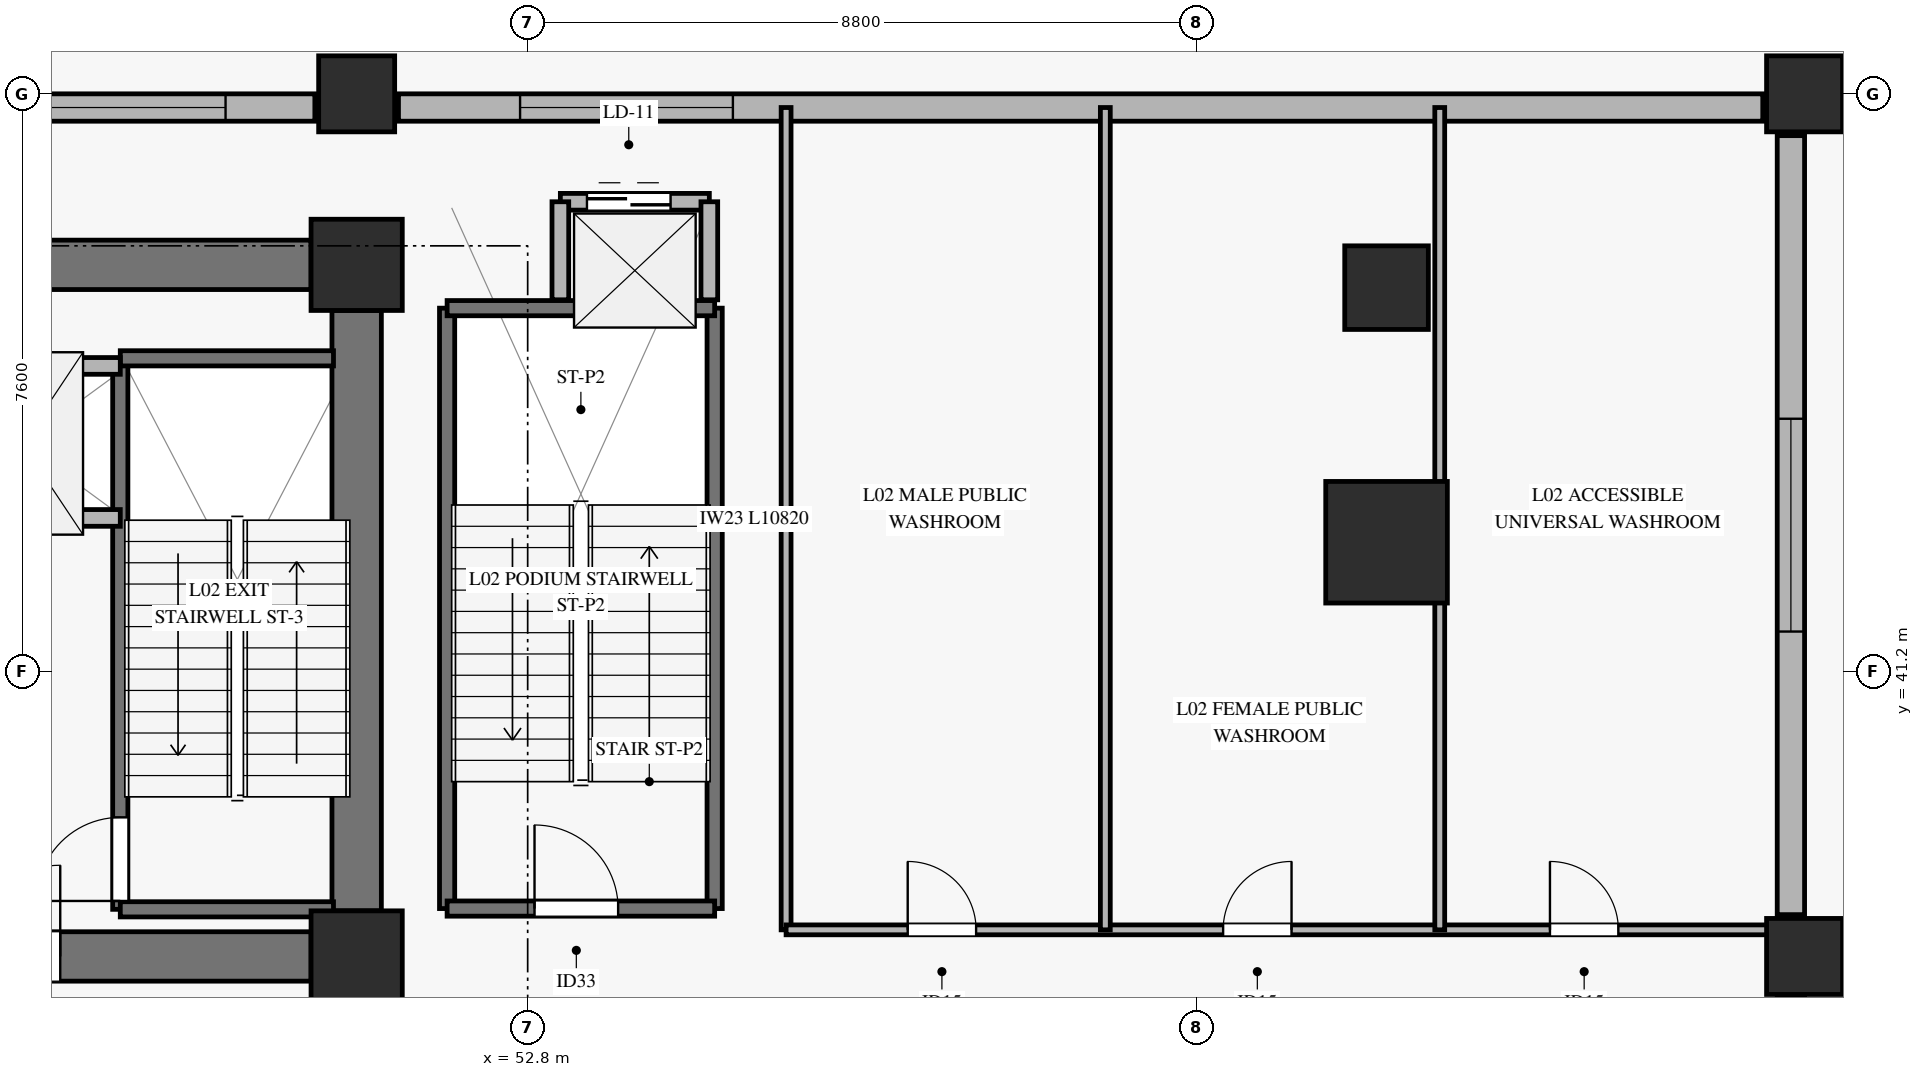
"""IFC4 building model, lengths in metres.
Left out: names, types, materials, properties, quantities, classifications, styles, units other than length and angle.
Written with IfcOpenShell. Run it as: python <this file> out.ifc"""

import sys

from ifc_helpers import new_model, si_unit, direction, frame, frame_2d, origin, origin_2d, place, context, subcontext, project, spatial, rectangle, hollow_rectangle, extrude, source, transform, mapped, element, fill, save


model = new_model("IFC4")
c1 = context("Model", 3, precision=1e-05, world=origin(), true_north=direction((0.0, 1.0)))
c2 = subcontext(c1, "Body", "Model", "MODEL_VIEW")
j1 = project(units=[si_unit("LENGTHUNIT", "METRE"), si_unit("PLANEANGLEUNIT", "RADIAN")], contexts=[c1])
p1 = place(None, origin())
s1 = spatial("IfcSite", under=j1, at=p1, CompositionType="ELEMENT")
p2 = place(p1, origin())
s2 = spatial("IfcBuilding", under=s1, at=p2, CompositionType="ELEMENT")
p3 = place(p2, frame((0.0, 0.0, 5.6)))
s3 = spatial("IfcBuildingStorey", under=s2, at=p3, CompositionType="ELEMENT", Elevation=5.6)
m1 = source(origin(), c2, "Body", "SweptSolid", [
    extrude(rectangle(XDim=1.2, YDim=1.2, at=origin_2d()), origin(), (0.0, 0.0, 1.0), 4.54),
])
for number, where, z_axis, x_axis in (
    (1, (50.55, 37.45, 0.0), (0.0, 0.0, 1.0), (1.0, 0.0, 0.0)),
    (2, (50.55, 46.55, 0.0), (0.0, 0.0, 1.0), (1.0, 0.0, 0.0)),
):
    element("IfcColumn", number, at=place(p3, frame(where, z_axis=z_axis, x_axis=x_axis)), inside=s3, PredefinedType="PILASTER", context=c2, shape_type="MappedRepresentation", body=[
        mapped(m1, transform((0.0, 0.0, 0.0), x_axis=(1.0, 0.0, 0.0), y_axis=(0.0, 1.0, 0.0), z_axis=(0.0, 0.0, 1.0), scale=1.0)),
    ])
p4 = place(p3, frame((44.9, 46.55, 0.0), z_axis=(0.0, 0.0, 1.0), x_axis=(1.0, 0.0, 0.0)))
e3 = element("IfcWall", 3, at=p4, inside=s3, PredefinedType="SHEAR", context=c2, shape_type="SweptSolid", body=[
    extrude(rectangle(XDim=5.05, YDim=0.65, at=frame_2d((2.525, 0.0))), origin(), (0.0, 0.0, 1.0), 4.54),
])
p5 = place(p3, frame((44.9, 37.45, 0.0), z_axis=(0.0, 0.0, 1.0), x_axis=(1.0, 0.0, 0.0)))
e4 = element("IfcWall", 4, at=p5, inside=s3, PredefinedType="SHEAR", context=c2, shape_type="SweptSolid", body=[
    extrude(rectangle(XDim=5.05, YDim=0.65, at=frame_2d((2.525, 0.0))), origin(), (0.0, 0.0, 1.0), 4.54),
])
p6 = place(p5, frame((0.55, 0.0, 0.0)))
e5 = element("IfcOpeningElement", 5, at=p6, cuts=e4, PredefinedType="OPENING", context=c2, shape_type="SweptSolid", body=[
    extrude(rectangle(XDim=1.2, YDim=2.15, at=frame_2d((0.6, 1.075))), frame((0.0, 0.335, 0.0), z_axis=(0.0, -1.0, 0.0), x_axis=(1.0, 0.0, 0.0)), (0.0, 0.0, 1.0), 0.67),
])
p7 = place(p3, frame((50.55, 38.05, 0.0), z_axis=(0.0, 0.0, 1.0), x_axis=(0.0, 1.0, 0.0)))
e6 = element("IfcWall", 6, at=p7, inside=s3, PredefinedType="SHEAR", context=c2, shape_type="SweptSolid", body=[
    extrude(rectangle(XDim=7.9, YDim=0.65, at=frame_2d((3.95, 0.0))), origin(), (0.0, 0.0, 1.0), 4.54),
])
m2 = source(origin(), c2, "Body", "SweptSolid", [
    extrude(hollow_rectangle(XDim=1.6, YDim=1.6, WallThickness=0.075, at=origin_2d()), origin(), (0.0, 0.0, 1.0), 4.54),
])
p8 = place(p3, frame((64.1, 42.9, 0.0), z_axis=(0.0, 0.0, 1.0), x_axis=(1.0, 0.0, 0.0)))
e7 = element("IfcColumn", 7, at=p8, inside=s3, PredefinedType="COLUMN", context=c2, shape_type="MappedRepresentation", body=[
    mapped(m2, transform((0.0, 0.0, 0.0), x_axis=(1.0, 0.0, 0.0), y_axis=(0.0, 1.0, 0.0), z_axis=(0.0, 0.0, 1.0), scale=1.0)),
])
m3 = source(origin(), c2, "Body", "SweptSolid", [
    extrude(hollow_rectangle(XDim=1.1, YDim=1.1, WallThickness=0.05, at=origin_2d()), origin(), (0.0, 0.0, 1.0), 4.54),
])
p9 = place(p3, frame((64.1, 46.25, 0.0), z_axis=(0.0, 0.0, 1.0), x_axis=(1.0, 0.0, 0.0)))
e8 = element("IfcColumn", 8, at=p9, inside=s3, PredefinedType="COLUMN", context=c2, shape_type="MappedRepresentation", body=[
    mapped(m3, transform((0.0, 0.0, 0.0), x_axis=(1.0, 0.0, 0.0), y_axis=(0.0, 1.0, 0.0), z_axis=(0.0, 0.0, 1.0), scale=1.0)),
])
m4 = source(origin(), c2, "Body", "SweptSolid", [
    extrude(hollow_rectangle(XDim=1.0, YDim=1.0, WallThickness=0.045, at=origin_2d()), origin(), (0.0, 0.0, 1.0), 4.54),
])
for number, where, z_axis, x_axis in (
    (9, (69.6, 37.45, 0.0), (0.0, 0.0, 1.0), (1.0, 0.0, 0.0)),
    (10, (50.55, 48.8, 0.0), (0.0, 0.0, 1.0), (1.0, 0.0, 0.0)),
    (11, (69.6, 48.8, 0.0), (0.0, 0.0, 1.0), (1.0, 0.0, 0.0)),
):
    element("IfcColumn", number, at=place(p3, frame(where, z_axis=z_axis, x_axis=x_axis)), inside=s3, PredefinedType="COLUMN", context=c2, shape_type="MappedRepresentation", body=[
        mapped(m4, transform((0.0, 0.0, 0.0), x_axis=(1.0, 0.0, 0.0), y_axis=(0.0, 1.0, 0.0), z_axis=(0.0, 0.0, 1.0), scale=1.0)),
    ])
p10 = place(p3, frame((44.85, 48.62, 0.0), z_axis=(0.0, 0.0, 1.0), x_axis=(1.0, 0.0, 0.0)))
e12 = element("IfcWall", 12, at=p10, inside=s3, PredefinedType="SOLIDWALL", context=c2, shape_type="SweptSolid", body=[
    extrude(rectangle(XDim=5.15, YDim=0.36, at=frame_2d((2.575, 0.0))), origin(), (0.0, 0.0, 1.0), 3.42),
])
p11 = place(p10, frame((1.175, 0.0, 0.72)))
e13 = element("IfcOpeningElement", 13, at=p11, cuts=e12, PredefinedType="OPENING", context=c2, shape_type="SweptSolid", body=[
    extrude(rectangle(XDim=2.8, YDim=2.0, at=frame_2d((1.4, 1.0))), frame((0.0, 0.19, 0.0), z_axis=(0.0, -1.0, 0.0), x_axis=(1.0, 0.0, 0.0)), (0.0, 0.0, 1.0), 0.38),
])
p12 = place(p3, frame((51.1, 48.62, 0.0), z_axis=(0.0, 0.0, 1.0), x_axis=(1.0, 0.0, 0.0)))
e14 = element("IfcWall", 14, at=p12, inside=s3, PredefinedType="SOLIDWALL", context=c2, shape_type="SweptSolid", body=[
    extrude(rectangle(XDim=17.95, YDim=0.36, at=frame_2d((8.975, 0.0))), origin(), (0.0, 0.0, 1.0), 3.42),
])
p13 = place(p12, frame((1.6, 0.0, 0.72)))
e15 = element("IfcOpeningElement", 15, at=p13, cuts=e14, PredefinedType="OPENING", context=c2, shape_type="SweptSolid", body=[
    extrude(rectangle(XDim=2.8, YDim=2.0, at=frame_2d((1.4, 1.0))), frame((0.0, 0.19, 0.0), z_axis=(0.0, -1.0, 0.0), x_axis=(1.0, 0.0, 0.0)), (0.0, 0.0, 1.0), 0.38),
])
p14 = place(p3, frame((69.42, 38.0, 0.0), z_axis=(0.0, 0.0, 1.0), x_axis=(0.0, 1.0, 0.0)))
e16 = element("IfcWall", 16, at=p14, inside=s3, PredefinedType="SOLIDWALL", context=c2, shape_type="SweptSolid", body=[
    extrude(rectangle(XDim=10.25, YDim=0.36, at=frame_2d((5.125, 0.0))), origin(), (0.0, 0.0, 1.0), 3.42),
])
p15 = place(p14, frame((3.725, 0.0, 0.72)))
e17 = element("IfcOpeningElement", 17, at=p15, cuts=e16, PredefinedType="OPENING", context=c2, shape_type="SweptSolid", body=[
    extrude(rectangle(XDim=2.8, YDim=2.0, at=frame_2d((1.4, 1.0))), frame((0.0, 0.19, 0.0), z_axis=(0.0, -1.0, 0.0), x_axis=(1.0, 0.0, 0.0)), (0.0, 0.0, 1.0), 0.38),
])
p16 = place(p3, frame((47.44, 38.07, 0.0), z_axis=(0.0, 0.0, 1.0), x_axis=(0.0, 1.0, 0.0)))
e18 = element("IfcWall", 18, at=p16, inside=s3, PredefinedType="SOLIDWALL", context=c2, shape_type="SweptSolid", body=[
    extrude(rectangle(XDim=7.25, YDim=0.2, at=frame_2d((3.625, 0.0))), origin(), (0.0, 0.0, 1.0), 4.8),
])
p17 = place(p16, frame((0.11, 0.0, 0.0)))
e19 = element("IfcOpeningElement", 19, at=p17, cuts=e18, PredefinedType="OPENING", context=c2, shape_type="SweptSolid", body=[
    extrude(rectangle(XDim=1.1, YDim=2.15, at=frame_2d((0.55, 1.075))), frame((0.0, 0.11, 0.0), z_axis=(0.0, -1.0, 0.0), x_axis=(1.0, 0.0, 0.0)), (0.0, 0.0, 1.0), 0.22),
])
for number, where, z_axis, x_axis in (
    (20, (47.44, 45.32, 0.0), (0.0, 0.0, 1.0), (1.0, 0.0, 0.0)),
    (21, (47.44, 38.07, 0.0), (0.0, 0.0, 1.0), (1.0, 0.0, 0.0)),
):
    element("IfcWall", number, at=place(p3, frame(where, z_axis=z_axis, x_axis=x_axis)), inside=s3, PredefinedType="SOLIDWALL", context=c2, shape_type="SweptSolid", body=[
        extrude(rectangle(XDim=2.805, YDim=0.2, at=frame_2d((1.403, 0.0))), origin(), (0.0, 0.0, 1.0), 4.8),
    ])
p18 = place(p3, frame((44.72, 43.22, 0.0), z_axis=(0.0, 0.0, 1.0), x_axis=(1.0, 0.0, 0.0)))
e22 = element("IfcWall", 22, at=p18, inside=s3, PredefinedType="SOLIDWALL", context=c2, shape_type="SweptSolid", body=[
    extrude(rectangle(XDim=2.72, YDim=0.22, at=frame_2d((1.36, 0.0))), origin(), (0.0, 0.0, 1.0), 4.54),
])
p19 = place(p18, frame((0.7, 0.0, 0.0)))
e23 = element("IfcOpeningElement", 23, at=p19, cuts=e22, PredefinedType="OPENING", context=c2, shape_type="SweptSolid", body=[
    extrude(rectangle(XDim=1.1, YDim=2.2, at=frame_2d((0.55, 1.1))), frame((0.0, 0.12, 0.0), z_axis=(0.0, -1.0, 0.0), x_axis=(1.0, 0.0, 0.0)), (0.0, 0.0, 1.0), 0.24),
])
p20 = place(p3, frame((44.72, 45.22, 0.0), z_axis=(0.0, 0.0, 1.0), x_axis=(1.0, 0.0, 0.0)))
e24 = element("IfcWall", 24, at=p20, inside=s3, PredefinedType="SOLIDWALL", context=c2, shape_type="SweptSolid", body=[
    extrude(rectangle(XDim=2.72, YDim=0.22, at=frame_2d((1.36, 0.0))), origin(), (0.0, 0.0, 1.0), 4.54),
])
for number, where, z_axis, x_axis in (
    (25, (51.74, 38.08, 0.0), (0.0, 0.0, 1.0), (0.0, 1.0, 0.0)),
    (26, (55.26, 38.08, 0.0), (0.0, 0.0, 1.0), (0.0, 1.0, 0.0)),
):
    element("IfcWall", number, at=place(p3, frame(where, z_axis=z_axis, x_axis=x_axis)), inside=s3, PredefinedType="SOLIDWALL", context=c2, shape_type="SweptSolid", body=[
        extrude(rectangle(XDim=7.9, YDim=0.2, at=frame_2d((3.95, 0.0))), origin(), (0.0, 0.0, 1.0), 4.8),
    ])
p21 = place(p3, frame((51.74, 45.98, 0.0), z_axis=(0.0, 0.0, 1.0), x_axis=(1.0, 0.0, 0.0)))
e27 = element("IfcWall", 27, at=p21, inside=s3, PredefinedType="SOLIDWALL", context=c2, shape_type="SweptSolid", body=[
    extrude(rectangle(XDim=3.52, YDim=0.2, at=frame_2d((1.76, 0.0))), origin(), (0.0, 0.0, 1.0), 4.8),
])
p22 = place(p3, frame((51.74, 38.08, 0.0), z_axis=(0.0, 0.0, 1.0), x_axis=(1.0, 0.0, 0.0)))
e28 = element("IfcWall", 28, at=p22, inside=s3, PredefinedType="SOLIDWALL", context=c2, shape_type="SweptSolid", body=[
    extrude(rectangle(XDim=3.52, YDim=0.2, at=frame_2d((1.76, 0.0))), origin(), (0.0, 0.0, 1.0), 4.8),
])
p23 = place(p22, frame((1.15, 0.0, 0.0)))
e29 = element("IfcOpeningElement", 29, at=p23, cuts=e28, PredefinedType="OPENING", context=c2, shape_type="SweptSolid", body=[
    extrude(rectangle(XDim=1.1, YDim=2.15, at=frame_2d((0.55, 1.075))), frame((0.0, 0.11, 0.0), z_axis=(0.0, -1.0, 0.0), x_axis=(1.0, 0.0, 0.0)), (0.0, 0.0, 1.0), 0.22),
])
p24 = place(p3, frame((53.23, 47.38, 0.0), z_axis=(0.0, 0.0, 1.0), x_axis=(1.0, 0.0, 0.0)))
e30 = element("IfcWall", 30, at=p24, inside=s3, PredefinedType="SOLIDWALL", context=c2, shape_type="SweptSolid", body=[
    extrude(rectangle(XDim=1.96, YDim=0.22, at=frame_2d((0.98, 0.0))), origin(), (0.0, 0.0, 1.0), 4.54),
])
p25 = place(p24, frame((0.35, 0.0, 0.0)))
e31 = element("IfcOpeningElement", 31, at=p25, cuts=e30, PredefinedType="OPENING", context=c2, shape_type="SweptSolid", body=[
    extrude(rectangle(XDim=1.1, YDim=2.2, at=frame_2d((0.55, 1.1))), frame((0.0, 0.12, 0.0), z_axis=(0.0, -1.0, 0.0), x_axis=(1.0, 0.0, 0.0)), (0.0, 0.0, 1.0), 0.24),
])
for number, where, z_axis, x_axis in (
    (32, (53.23, 46.09, 0.0), (0.0, 0.0, 1.0), (0.0, 1.0, 0.0)),
    (33, (55.19, 46.09, 0.0), (0.0, 0.0, 1.0), (0.0, 1.0, 0.0)),
):
    element("IfcWall", number, at=place(p3, frame(where, z_axis=z_axis, x_axis=x_axis)), inside=s3, PredefinedType="SOLIDWALL", context=c2, shape_type="SweptSolid", body=[
        extrude(rectangle(XDim=1.29, YDim=0.22, at=frame_2d((0.645, 0.0))), origin(), (0.0, 0.0, 1.0), 4.54),
    ])
p26 = place(p3, frame((56.2, 37.8, 0.0), z_axis=(0.0, 0.0, 1.0), x_axis=(0.0, 1.0, 0.0)))
e34 = element("IfcWall", 34, at=p26, inside=s3, PredefinedType="PARTITIONING", context=c2, shape_type="SweptSolid", body=[
    extrude(rectangle(XDim=10.82, YDim=0.13, at=frame_2d((5.41, 0.0))), origin(), (0.0, 0.0, 1.0), 4.54),
])
p27 = place(p3, frame((56.2, 37.8, 0.0), z_axis=(0.0, 0.0, 1.0), x_axis=(1.0, 0.0, 0.0)))
e35 = element("IfcWall", 35, at=p27, inside=s3, PredefinedType="PARTITIONING", context=c2, shape_type="SweptSolid", body=[
    extrude(rectangle(XDim=13.22, YDim=0.13, at=frame_2d((6.61, 0.0))), origin(), (0.0, 0.0, 1.0), 3.425),
])
p28 = place(p27, frame((1.6, 0.0, 0.0)))
e36 = element("IfcOpeningElement", 36, at=p28, cuts=e35, PredefinedType="OPENING", context=c2, shape_type="SweptSolid", body=[
    extrude(rectangle(XDim=0.9, YDim=2.1, at=frame_2d((0.45, 1.05))), frame((0.0, 0.075, 0.0), z_axis=(0.0, -1.0, 0.0), x_axis=(1.0, 0.0, 0.0)), (0.0, 0.0, 1.0), 0.15),
])
p29 = place(p27, frame((5.75, 0.0, 0.0)))
e37 = element("IfcOpeningElement", 37, at=p29, cuts=e35, PredefinedType="OPENING", context=c2, shape_type="SweptSolid", body=[
    extrude(rectangle(XDim=0.9, YDim=2.1, at=frame_2d((0.45, 1.05))), frame((0.0, 0.075, 0.0), z_axis=(0.0, -1.0, 0.0), x_axis=(1.0, 0.0, 0.0)), (0.0, 0.0, 1.0), 0.15),
])
p30 = place(p27, frame((10.05, 0.0, 0.0)))
e38 = element("IfcOpeningElement", 38, at=p30, cuts=e35, PredefinedType="OPENING", context=c2, shape_type="SweptSolid", body=[
    extrude(rectangle(XDim=0.9, YDim=2.1, at=frame_2d((0.45, 1.05))), frame((0.0, 0.075, 0.0), z_axis=(0.0, -1.0, 0.0), x_axis=(1.0, 0.0, 0.0)), (0.0, 0.0, 1.0), 0.15),
])
p31 = place(p3, frame((60.4, 37.8, 0.0), z_axis=(0.0, 0.0, 1.0), x_axis=(0.0, 1.0, 0.0)))
e39 = element("IfcWall", 39, at=p31, inside=s3, PredefinedType="PARTITIONING", context=c2, shape_type="SweptSolid", body=[
    extrude(rectangle(XDim=10.82, YDim=0.13, at=frame_2d((5.41, 0.0))), origin(), (0.0, 0.0, 1.0), 4.54),
])
p32 = place(p3, frame((64.8, 37.8, 0.0), z_axis=(0.0, 0.0, 1.0), x_axis=(0.0, 1.0, 0.0)))
e40 = element("IfcWall", 40, at=p32, inside=s3, PredefinedType="PARTITIONING", context=c2, shape_type="SweptSolid", body=[
    extrude(rectangle(XDim=10.82, YDim=0.13, at=frame_2d((5.41, 0.0))), origin(), (0.0, 0.0, 1.0), 3.425),
])
m5 = source(origin(), c2, "Body", "SweptSolid", [
    extrude(rectangle(XDim=2.8, YDim=2.0, at=frame_2d((1.4, 1.0))), frame((0.0, 0.03, 0.0), z_axis=(0.0, -1.0, 0.0), x_axis=(1.0, 0.0, 0.0)), (0.0, 0.0, 1.0), 0.06),
])
p33 = place(p11, origin())
e41 = element("IfcWindow", 41, at=p33, inside=s3, PartitioningType="SINGLE_PANEL", PredefinedType="WINDOW", context=c2, shape_type="MappedRepresentation", body=[
    mapped(m5, transform((0.0, 0.0, 0.0), x_axis=(1.0, 0.0, 0.0), y_axis=(0.0, 1.0, 0.0), z_axis=(0.0, 0.0, 1.0), scale=1.0)),
])
fill(e13, e41)
p34 = place(p13, origin())
e42 = element("IfcWindow", 42, at=p34, inside=s3, PartitioningType="SINGLE_PANEL", PredefinedType="WINDOW", context=c2, shape_type="MappedRepresentation", body=[
    mapped(m5, transform((0.0, 0.0, 0.0), x_axis=(1.0, 0.0, 0.0), y_axis=(0.0, 1.0, 0.0), z_axis=(0.0, 0.0, 1.0), scale=1.0)),
])
fill(e15, e42)
p35 = place(p15, origin())
e43 = element("IfcWindow", 43, at=p35, inside=s3, PartitioningType="SINGLE_PANEL", PredefinedType="WINDOW", context=c2, shape_type="MappedRepresentation", body=[
    mapped(m5, transform((0.0, 0.0, 0.0), x_axis=(1.0, 0.0, 0.0), y_axis=(0.0, 1.0, 0.0), z_axis=(0.0, 0.0, 1.0), scale=1.0)),
])
fill(e17, e43)
m6 = source(origin(), c2, "Body", "SweptSolid", [
    extrude(rectangle(XDim=1.1, YDim=2.15, at=frame_2d((0.55, 1.075))), frame((0.0, 0.025, 0.0), z_axis=(0.0, -1.0, 0.0), x_axis=(1.0, 0.0, 0.0)), (0.0, 0.0, 1.0), 0.05),
])
p36 = place(p17, origin())
e44 = element("IfcDoor", 44, at=p36, inside=s3, OperationType="SINGLE_SWING_LEFT", PredefinedType="DOOR", context=c2, shape_type="MappedRepresentation", body=[
    mapped(m6, transform((0.0, 0.0, 0.0), x_axis=(1.0, 0.0, 0.0), y_axis=(0.0, 1.0, 0.0), z_axis=(0.0, 0.0, 1.0), scale=1.0)),
])
fill(e19, e44)
m7 = source(origin(), c2, "Body", "SweptSolid", [
    extrude(rectangle(XDim=1.2, YDim=2.15, at=frame_2d((0.6, 1.075))), frame((0.0, 0.025, 0.0), z_axis=(0.0, -1.0, 0.0), x_axis=(1.0, 0.0, 0.0)), (0.0, 0.0, 1.0), 0.05),
])
p37 = place(p6, origin())
e45 = element("IfcDoor", 45, at=p37, inside=s3, OperationType="SINGLE_SWING_RIGHT", PredefinedType="DOOR", context=c2, shape_type="MappedRepresentation", body=[
    mapped(m7, transform((0.0, 0.0, 0.0), x_axis=(1.0, 0.0, 0.0), y_axis=(0.0, 1.0, 0.0), z_axis=(0.0, 0.0, 1.0), scale=1.0)),
])
fill(e5, e45)
p38 = place(p23, origin())
e46 = element("IfcDoor", 46, at=p38, inside=s3, OperationType="SINGLE_SWING_LEFT", PredefinedType="DOOR", context=c2, shape_type="MappedRepresentation", body=[
    mapped(m6, transform((0.0, 0.0, 0.0), x_axis=(1.0, 0.0, 0.0), y_axis=(0.0, 1.0, 0.0), z_axis=(0.0, 0.0, 1.0), scale=1.0)),
])
fill(e29, e46)
m8 = source(origin(), c2, "Body", "SweptSolid", [
    extrude(rectangle(XDim=1.1, YDim=2.2, at=frame_2d((0.55, 1.1))), frame((0.0, 0.025, 0.0), z_axis=(0.0, -1.0, 0.0), x_axis=(1.0, 0.0, 0.0)), (0.0, 0.0, 1.0), 0.05),
])
p39 = place(p25, origin())
e47 = element("IfcDoor", 47, at=p39, inside=s3, OperationType="SLIDING_TO_LEFT", PredefinedType="DOOR", context=c2, shape_type="MappedRepresentation", body=[
    mapped(m8, transform((0.0, 0.0, 0.0), x_axis=(1.0, 0.0, 0.0), y_axis=(0.0, 1.0, 0.0), z_axis=(0.0, 0.0, 1.0), scale=1.0)),
])
fill(e31, e47)
m9 = source(origin(), c2, "Body", "SweptSolid", [
    extrude(rectangle(XDim=0.9, YDim=2.1, at=frame_2d((0.45, 1.05))), frame((0.0, 0.025, 0.0), z_axis=(0.0, -1.0, 0.0), x_axis=(1.0, 0.0, 0.0)), (0.0, 0.0, 1.0), 0.05),
])
p40 = place(p28, origin())
e48 = element("IfcDoor", 48, at=p40, inside=s3, OperationType="SINGLE_SWING_LEFT", PredefinedType="DOOR", context=c2, shape_type="MappedRepresentation", body=[
    mapped(m9, transform((0.0, 0.0, 0.0), x_axis=(1.0, 0.0, 0.0), y_axis=(0.0, 1.0, 0.0), z_axis=(0.0, 0.0, 1.0), scale=1.0)),
])
fill(e36, e48)
p41 = place(p29, origin())
e49 = element("IfcDoor", 49, at=p41, inside=s3, OperationType="SINGLE_SWING_RIGHT", PredefinedType="DOOR", context=c2, shape_type="MappedRepresentation", body=[
    mapped(m9, transform((0.0, 0.0, 0.0), x_axis=(1.0, 0.0, 0.0), y_axis=(0.0, 1.0, 0.0), z_axis=(0.0, 0.0, 1.0), scale=1.0)),
])
fill(e37, e49)
p42 = place(p30, origin())
e50 = element("IfcDoor", 50, at=p42, inside=s3, OperationType="SINGLE_SWING_LEFT", PredefinedType="DOOR", context=c2, shape_type="MappedRepresentation", body=[
    mapped(m9, transform((0.0, 0.0, 0.0), x_axis=(1.0, 0.0, 0.0), y_axis=(0.0, 1.0, 0.0), z_axis=(0.0, 0.0, 1.0), scale=1.0)),
])
fill(e38, e50)
save(model, sys.argv[1])
